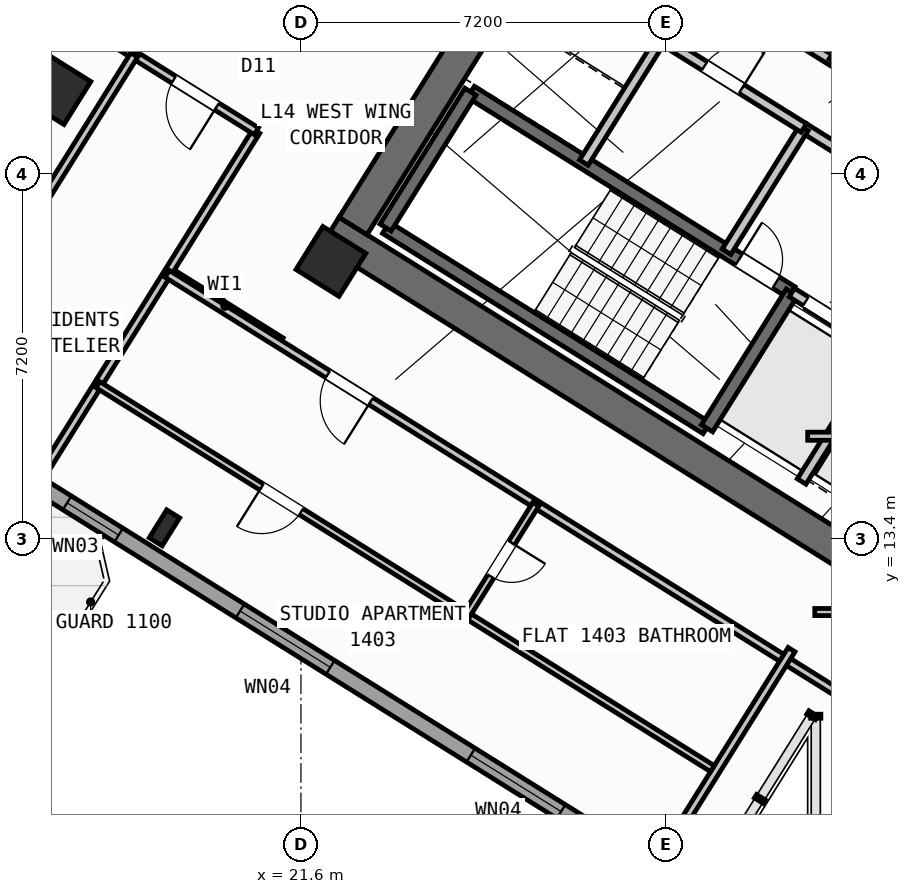
"""IFC4 building model, lengths in metres.
Left out: names, types, materials, properties, quantities, classifications, styles, units other than length and angle.
Written with IfcOpenShell. Run it as: python <this file> out.ifc"""

import sys

from ifc_helpers import new_model, si_unit, direction, frame, frame_2d, origin, origin_2d, place, context, subcontext, project, spatial, rectangle, hollow_rectangle, i_section, extrude, source, transform, mapped, element, fill, save


model = new_model("IFC4")
c1 = context("Model", 3, precision=1e-05, world=origin(), true_north=direction((0.0, 1.0)))
c2 = subcontext(c1, "Body", "Model", "MODEL_VIEW")
j1 = project(units=[si_unit("LENGTHUNIT", "METRE"), si_unit("PLANEANGLEUNIT", "RADIAN")], contexts=[c1])
p1 = place(None, origin())
s1 = spatial("IfcSite", under=j1, at=p1, CompositionType="ELEMENT")
p2 = place(p1, origin())
s2 = spatial("IfcBuilding", under=s1, at=p2, CompositionType="ELEMENT")
p3 = place(p2, frame((0.0, 0.0, 56.4)))
s3 = spatial("IfcBuildingStorey", under=s2, at=p3, CompositionType="ELEMENT", Elevation=56.4)
p4 = place(p3, frame((33.409, 12.45, 0.0), z_axis=(0.0, 0.0, 1.0), x_axis=(-0.848051132073, 0.529914405721, 0.0)))
e1 = element("IfcWall", 1, at=p4, inside=s3, PredefinedType="SHEAR", context=c2, shape_type="SweptSolid", body=[
    extrude(rectangle(XDim=13.24, YDim=0.65, at=frame_2d((6.62, 0.0))), origin(), (0.0, 0.0, 1.0), 3.35),
])
p5 = place(p3, frame((26.007, 24.976, 0.0), z_axis=(0.0, 0.0, 1.0), x_axis=(-0.529916319127, -0.848049936456, 0.0)))
e2 = element("IfcWall", 2, at=p5, inside=s3, PredefinedType="SHEAR", context=c2, shape_type="SweptSolid", body=[
    extrude(rectangle(XDim=6.375, YDim=0.65, at=frame_2d((3.188, 0.0))), origin(), (0.0, 0.0, 1.0), 3.35),
])
m1 = source(origin(), c2, "Body", "SweptSolid", [
    extrude(hollow_rectangle(XDim=1.0, YDim=1.0, WallThickness=0.04, at=origin_2d()), origin(), (0.0, 0.0, 1.0), 3.6),
])
p6 = place(p3, frame((22.191, 18.87, 0.0), z_axis=(0.0, 0.0, 1.0), x_axis=(-0.848048096156, 0.529919264233, 0.0)))
e3 = element("IfcColumn", 3, at=p6, inside=s3, PredefinedType="COLUMN", context=c2, shape_type="MappedRepresentation", body=[
    mapped(m1, transform((0.0, 0.0, 0.0), scale=1.0)),
])
m2 = source(origin(), c2, "Body", "SweptSolid", [
    extrude(i_section(OverallWidth=0.3, OverallDepth=0.65, WebThickness=0.016, FlangeThickness=0.031, at=origin_2d()), origin(), (0.0, 0.0, 1.0), 3.6),
])
p7 = place(p3, frame((18.906, 13.612, 0.0), z_axis=(0.0, 0.0, 1.0), x_axis=(-0.848048096156, 0.529919264233, 0.0)))
e4 = element("IfcColumn", 4, at=p7, inside=s3, PredefinedType="COLUMN", context=c2, shape_type="MappedRepresentation", body=[
    mapped(m2, transform((0.0, 0.0, 0.0), scale=1.0)),
])
p8 = place(p3, frame((16.764, 22.261, 0.0), z_axis=(0.0, 0.0, 1.0), x_axis=(-0.848048096156, 0.529919264233, 0.0)))
e5 = element("IfcColumn", 5, at=p8, inside=s3, PredefinedType="COLUMN", context=c2, shape_type="MappedRepresentation", body=[
    mapped(m1, transform((0.0, 0.0, 0.0), scale=1.0)),
])
p9 = place(p3, frame((29.268, 6.429, 0.0), z_axis=(0.0, 0.0, 1.0), x_axis=(-0.848049971435, 0.529916263149, 0.0)))
e6 = element("IfcWall", 6, at=p9, inside=s3, PredefinedType="STANDARD", context=c2, shape_type="SweptSolid", body=[
    extrude(rectangle(XDim=31.588, YDim=0.32, at=frame_2d((15.794, 0.0))), origin(), (0.0, 0.0, 1.0), 3.35),
])
p10 = place(p9, frame((16.235, 0.0, 0.0)))
e7 = element("IfcOpeningElement", 7, at=p10, cuts=e6, PredefinedType="OPENING", context=c2, shape_type="SweptSolid", body=[
    extrude(rectangle(XDim=1.2, YDim=2.15, at=frame_2d((0.6, 1.075))), frame((0.0, 0.17, 0.0), z_axis=(0.0, -1.0, 0.0), x_axis=(1.0, 0.0, 0.0)), (0.0, 0.0, 1.0), 0.34),
])
p11 = place(p9, frame((2.989, 0.0, 0.8)))
e8 = element("IfcOpeningElement", 8, at=p11, cuts=e6, PredefinedType="OPENING", context=c2, shape_type="SweptSolid", body=[
    extrude(rectangle(XDim=2.1, YDim=1.55, at=frame_2d((1.05, 0.775))), frame((0.0, 0.17, 0.0), z_axis=(0.0, -1.0, 0.0), x_axis=(1.0, 0.0, 0.0)), (0.0, 0.0, 1.0), 0.34),
])
p12 = place(p9, frame((8.359, 0.0, 0.8)))
e9 = element("IfcOpeningElement", 9, at=p12, cuts=e6, PredefinedType="OPENING", context=c2, shape_type="SweptSolid", body=[
    extrude(rectangle(XDim=2.1, YDim=1.55, at=frame_2d((1.05, 0.775))), frame((0.0, 0.17, 0.0), z_axis=(0.0, -1.0, 0.0), x_axis=(1.0, 0.0, 0.0)), (0.0, 0.0, 1.0), 0.34),
])
p13 = place(p9, frame((13.284, 0.0, 0.95)))
e10 = element("IfcOpeningElement", 10, at=p13, cuts=e6, PredefinedType="OPENING", context=c2, shape_type="SweptSolid", body=[
    extrude(rectangle(XDim=1.2, YDim=1.4, at=frame_2d((0.6, 0.7))), frame((0.0, 0.17, 0.0), z_axis=(0.0, -1.0, 0.0), x_axis=(1.0, 0.0, 0.0)), (0.0, 0.0, 1.0), 0.34),
])
p14 = place(p9, frame((22.374, 0.0, 0.95)))
e11 = element("IfcOpeningElement", 11, at=p14, cuts=e6, PredefinedType="OPENING", context=c2, shape_type="SweptSolid", body=[
    extrude(rectangle(XDim=1.2, YDim=1.4, at=frame_2d((0.6, 0.7))), frame((0.0, 0.17, 0.0), z_axis=(0.0, -1.0, 0.0), x_axis=(1.0, 0.0, 0.0)), (0.0, 0.0, 1.0), 0.34),
])
p15 = place(p9, frame((26.351, 0.0, 1.0)))
e12 = element("IfcOpeningElement", 12, at=p15, cuts=e6, PredefinedType="OPENING", context=c2, shape_type="SweptSolid", body=[
    extrude(rectangle(XDim=0.9, YDim=1.25, at=frame_2d((0.45, 0.625))), frame((0.0, 0.17, 0.0), z_axis=(0.0, -1.0, 0.0), x_axis=(1.0, 0.0, 0.0)), (0.0, 0.0, 1.0), 0.34),
])
p16 = place(p9, frame((29.052, 0.0, 0.85)))
e13 = element("IfcOpeningElement", 13, at=p16, cuts=e6, PredefinedType="OPENING", context=c2, shape_type="SweptSolid", body=[
    extrude(rectangle(XDim=1.8, YDim=1.5, at=frame_2d((0.9, 0.75))), frame((0.0, 0.17, 0.0), z_axis=(0.0, -1.0, 0.0), x_axis=(1.0, 0.0, 0.0)), (0.0, 0.0, 1.0), 0.34),
])
p17 = place(p3, frame((29.605, 15.581, 0.0), z_axis=(0.0, 0.0, 1.0), x_axis=(-0.848036911448, 0.529937163087, 0.0)))
e14 = element("IfcWall", 14, at=p17, inside=s3, PredefinedType="SHEAR", context=c2, shape_type="SweptSolid", body=[
    extrude(rectangle(XDim=7.46, YDim=0.26, at=frame_2d((3.73, 0.0))), origin(), (0.0, 0.0, 1.0), 3.35),
])
p18 = place(p3, frame((31.28, 18.261, 0.0), z_axis=(0.0, 0.0, 1.0), x_axis=(-0.848051618787, 0.529913626805, 0.0)))
e15 = element("IfcWall", 15, at=p18, inside=s3, PredefinedType="SHEAR", context=c2, shape_type="SweptSolid", body=[
    extrude(rectangle(XDim=7.46, YDim=0.26, at=frame_2d((3.73, 0.0))), origin(), (0.0, 0.0, 1.0), 3.35),
])
p19 = place(p18, frame((0.36, 0.0, 0.0)))
e16 = element("IfcOpeningElement", 16, at=p19, cuts=e15, PredefinedType="OPENING", context=c2, shape_type="SweptSolid", body=[
    extrude(rectangle(XDim=0.86, YDim=2.05, at=frame_2d((0.43, 1.025))), frame((0.0, 0.14, 0.0), z_axis=(0.0, -1.0, 0.0), x_axis=(1.0, 0.0, 0.0)), (0.0, 0.0, 1.0), 0.28),
])
p20 = place(p3, frame((31.288, 18.256, 0.0), z_axis=(0.0, 0.0, 1.0), x_axis=(-0.529943379326, -0.848033026897, 0.0)))
e17 = element("IfcWall", 17, at=p20, inside=s3, PredefinedType="SHEAR", context=c2, shape_type="SweptSolid", body=[
    extrude(rectangle(XDim=3.16, YDim=0.26, at=frame_2d((1.58, 0.0))), origin(), (0.0, 0.0, 1.0), 3.35),
])
p21 = place(p3, frame((24.945, 22.22, 0.0), z_axis=(0.0, 0.0, 1.0), x_axis=(-0.529908658664, -0.84805472316, 0.0)))
e18 = element("IfcWall", 18, at=p21, inside=s3, PredefinedType="SHEAR", context=c2, shape_type="SweptSolid", body=[
    extrude(rectangle(XDim=3.16, YDim=0.26, at=frame_2d((1.58, 0.0))), origin(), (0.0, 0.0, 1.0), 3.35),
])
p22 = place(p3, frame((38.046, 21.108, 0.0), z_axis=(0.0, 0.0, 1.0), x_axis=(-0.848054434086, 0.529909121291, 0.0)))
e19 = element("IfcWall", 19, at=p22, inside=s3, PredefinedType="SHEAR", context=c2, shape_type="SweptSolid", body=[
    extrude(rectangle(XDim=7.33, YDim=0.26, at=frame_2d((3.665, 0.0))), origin(), (0.0, 0.0, 1.0), 3.35),
])
p23 = place(p22, frame((0.22, 0.0, 0.0)))
e20 = element("IfcOpeningElement", 20, at=p23, cuts=e19, PredefinedType="OPENING", context=c2, shape_type="SweptSolid", body=[
    extrude(rectangle(XDim=1.1, YDim=2.1, at=frame_2d((0.55, 1.05))), frame((0.0, 0.14, 0.0), z_axis=(0.0, -1.0, 0.0), x_axis=(1.0, 0.0, 0.0)), (0.0, 0.0, 1.0), 0.28),
])
p24 = place(p3, frame((34.848, 16.031, 0.0), z_axis=(0.0, 0.0, 1.0), x_axis=(-0.848044042236, 0.529925751807, 0.0)))
e21 = element("IfcWall", 21, at=p24, inside=s3, PredefinedType="STANDARD", context=c2, shape_type="SweptSolid", body=[
    extrude(rectangle(XDim=4.198, YDim=0.2, at=frame_2d((2.099, 0.0))), origin(), (0.0, 0.0, 1.0), 3.34),
])
p25 = place(p24, frame((0.348, 0.0, 0.0)))
e22 = element("IfcOpeningElement", 22, at=p25, cuts=e21, PredefinedType="OPENING", context=c2, shape_type="SweptSolid", body=[
    extrude(rectangle(XDim=1.3, YDim=2.2, at=frame_2d((0.65, 1.1))), frame((0.0, 0.11, 0.0), z_axis=(0.0, -1.0, 0.0), x_axis=(1.0, 0.0, 0.0)), (0.0, 0.0, 1.0), 0.22),
])
p26 = place(p24, frame((2.423, 0.0, 0.0)))
e23 = element("IfcOpeningElement", 23, at=p26, cuts=e21, PredefinedType="OPENING", context=c2, shape_type="SweptSolid", body=[
    extrude(rectangle(XDim=1.45, YDim=2.25, at=frame_2d((0.725, 1.125))), frame((0.0, 0.11, 0.0), z_axis=(0.0, -1.0, 0.0), x_axis=(1.0, 0.0, 0.0)), (0.0, 0.0, 1.0), 0.22),
])
p27 = place(p3, frame((36.374, 18.474, 0.0), z_axis=(0.0, 0.0, 1.0), x_axis=(-0.848051071577, 0.529914502535, 0.0)))
e24 = element("IfcWall", 24, at=p27, inside=s3, PredefinedType="STANDARD", context=c2, shape_type="SweptSolid", body=[
    extrude(rectangle(XDim=5.718, YDim=0.2, at=frame_2d((2.859, 0.0))), origin(), (0.0, 0.0, 1.0), 3.34),
])
p28 = place(p27, frame((2.498, 0.0, 0.0)))
e25 = element("IfcOpeningElement", 25, at=p28, cuts=e24, PredefinedType="OPENING", context=c2, shape_type="SweptSolid", body=[
    extrude(rectangle(XDim=1.15, YDim=2.1, at=frame_2d((0.575, 1.05))), frame((0.0, 0.11, 0.0), z_axis=(0.0, -1.0, 0.0), x_axis=(1.0, 0.0, 0.0)), (0.0, 0.0, 1.0), 0.22),
])
p29 = place(p3, frame((32.108, 22.814, 0.0), z_axis=(0.0, 0.0, 1.0), x_axis=(-0.848042229521, 0.529928652696, 0.0)))
e26 = element("IfcWall", 26, at=p29, inside=s3, PredefinedType="STANDARD", context=c2, shape_type="SweptSolid", body=[
    extrude(rectangle(XDim=5.62, YDim=0.2, at=frame_2d((2.81, 0.0))), origin(), (0.0, 0.0, 1.0), 3.34),
])
p30 = place(p3, frame((32.982, 24.213, 0.0), z_axis=(0.0, 0.0, 1.0), x_axis=(-0.529839334948, -0.84809803628, 0.0)))
e27 = element("IfcWall", 27, at=p30, inside=s3, PredefinedType="STANDARD", context=c2, shape_type="SweptSolid", body=[
    extrude(rectangle(XDim=1.65, YDim=0.2, at=frame_2d((0.825, 0.0))), origin(), (0.0, 0.0, 1.0), 3.34),
])
p31 = place(p3, frame((33.029, 17.003, 0.0), z_axis=(0.0, 0.0, 1.0), x_axis=(-0.529916267533, -0.848049968695, 0.0)))
e28 = element("IfcWall", 28, at=p31, inside=s3, PredefinedType="STANDARD", context=c2, shape_type="SweptSolid", body=[
    extrude(rectangle(XDim=2.92, YDim=0.2, at=frame_2d((1.46, 0.0))), origin(), (0.0, 0.0, 1.0), 3.34),
])
for number, where, z_axis, x_axis in (
    (29, (31.525, 21.504, 0.0), (0.0, 0.0, 1.0), (-0.53, -0.848, 0.0)),
    (30, (28.71, 23.263, 0.0), (0.0, 0.0, 1.0), (-0.53, -0.848, 0.0)),
):
    element("IfcWall", number, at=place(p3, frame(where, z_axis=z_axis, x_axis=x_axis)), inside=s3, PredefinedType="STANDARD", context=c2, shape_type="SweptSolid", body=[
        extrude(rectangle(XDim=2.88, YDim=0.2, at=frame_2d((1.44, 0.0))), origin(), (0.0, 0.0, 1.0), 3.34),
    ])
p32 = place(p3, frame((31.525, 21.504, 0.0), z_axis=(0.0, 0.0, 1.0), x_axis=(-0.848044998614, 0.529924221305, 0.0)))
e31 = element("IfcWall", 31, at=p32, inside=s3, PredefinedType="STANDARD", context=c2, shape_type="SweptSolid", body=[
    extrude(rectangle(XDim=6.168, YDim=0.2, at=frame_2d((3.084, 0.0))), origin(), (0.0, 0.0, 1.0), 3.34),
])
p33 = place(p32, frame((4.4, 0.0, 0.0)))
e32 = element("IfcOpeningElement", 32, at=p33, cuts=e31, PredefinedType="OPENING", context=c2, shape_type="SweptSolid", body=[
    extrude(rectangle(XDim=0.86, YDim=2.05, at=frame_2d((0.43, 1.025))), frame((0.0, 0.11, 0.0), z_axis=(0.0, -1.0, 0.0), x_axis=(1.0, 0.0, 0.0)), (0.0, 0.0, 1.0), 0.22),
])
p34 = place(p32, frame((1.45, 0.0, 0.0)))
e33 = element("IfcOpeningElement", 33, at=p34, cuts=e31, PredefinedType="OPENING", context=c2, shape_type="SweptSolid", body=[
    extrude(rectangle(XDim=0.86, YDim=2.05, at=frame_2d((0.43, 1.025))), frame((0.0, 0.11, 0.0), z_axis=(0.0, -1.0, 0.0), x_axis=(1.0, 0.0, 0.0)), (0.0, 0.0, 1.0), 0.22),
])
p35 = place(p3, frame((21.206, 17.292, 0.0), z_axis=(0.0, 0.0, 1.0), x_axis=(-0.848050851465, 0.529914854792, 0.0)))
e34 = element("IfcWall", 34, at=p35, inside=s3, PredefinedType="PARTITIONING", context=c2, shape_type="SweptSolid", body=[
    extrude(rectangle(XDim=2.61, YDim=0.16, at=frame_2d((1.305, 0.0))), origin(), (0.0, 0.0, 1.0), 3.34),
])
p36 = place(p3, frame((20.719, 21.44, 0.0), z_axis=(0.0, 0.0, 1.0), x_axis=(-0.529906246318, -0.848056230514, 0.0)))
e35 = element("IfcWall", 35, at=p36, inside=s3, PredefinedType="PARTITIONING", context=c2, shape_type="SweptSolid", body=[
    extrude(rectangle(XDim=8.05, YDim=0.16, at=frame_2d((4.025, 0.0))), origin(), (0.0, 0.0, 1.0), 3.34),
])
p37 = place(p3, frame((20.719, 21.44, 0.0), z_axis=(0.0, 0.0, 1.0), x_axis=(-0.848048310262, 0.529918921593, 0.0)))
e36 = element("IfcWall", 36, at=p37, inside=s3, PredefinedType="PARTITIONING", context=c2, shape_type="SweptSolid", body=[
    extrude(rectangle(XDim=16.73, YDim=0.16, at=frame_2d((8.365, 0.0))), origin(), (0.0, 0.0, 1.0), 3.34),
])
p38 = place(p37, frame((0.92, 0.0, 0.0)))
e37 = element("IfcOpeningElement", 37, at=p38, cuts=e36, PredefinedType="OPENING", context=c2, shape_type="SweptSolid", body=[
    extrude(rectangle(XDim=1.0, YDim=2.1, at=frame_2d((0.5, 1.05))), frame((0.0, 0.09, 0.0), z_axis=(0.0, -1.0, 0.0), x_axis=(1.0, 0.0, 0.0)), (0.0, 0.0, 1.0), 0.18),
])
p39 = place(p37, frame((4.408, 0.0, 0.0)))
e38 = element("IfcOpeningElement", 38, at=p39, cuts=e36, PredefinedType="OPENING", context=c2, shape_type="SweptSolid", body=[
    extrude(rectangle(XDim=1.0, YDim=2.1, at=frame_2d((0.5, 1.05))), frame((0.0, 0.09, 0.0), z_axis=(0.0, -1.0, 0.0), x_axis=(1.0, 0.0, 0.0)), (0.0, 0.0, 1.0), 0.18),
])
p40 = place(p37, frame((7.271, 0.0, 0.0)))
e39 = element("IfcOpeningElement", 39, at=p40, cuts=e36, PredefinedType="OPENING", context=c2, shape_type="SweptSolid", body=[
    extrude(rectangle(XDim=1.0, YDim=2.1, at=frame_2d((0.5, 1.05))), frame((0.0, 0.09, 0.0), z_axis=(0.0, -1.0, 0.0), x_axis=(1.0, 0.0, 0.0)), (0.0, 0.0, 1.0), 0.18),
])
p41 = place(p37, frame((10.78, 0.0, 0.0)))
e40 = element("IfcOpeningElement", 40, at=p41, cuts=e36, PredefinedType="OPENING", context=c2, shape_type="SweptSolid", body=[
    extrude(rectangle(XDim=1.0, YDim=2.1, at=frame_2d((0.5, 1.05))), frame((0.0, 0.09, 0.0), z_axis=(0.0, -1.0, 0.0), x_axis=(1.0, 0.0, 0.0)), (0.0, 0.0, 1.0), 0.18),
])
p42 = place(p37, frame((14.372, 0.0, 0.0)))
e41 = element("IfcOpeningElement", 41, at=p42, cuts=e36, PredefinedType="OPENING", context=c2, shape_type="SweptSolid", body=[
    extrude(rectangle(XDim=1.0, YDim=2.1, at=frame_2d((0.5, 1.05))), frame((0.0, 0.09, 0.0), z_axis=(0.0, -1.0, 0.0), x_axis=(1.0, 0.0, 0.0)), (0.0, 0.0, 1.0), 0.18),
])
p43 = place(p3, frame((18.31, 22.946, 0.0), z_axis=(0.0, 0.0, 1.0), x_axis=(-0.529914428959, -0.848051117552, 0.0)))
e42 = element("IfcWall", 42, at=p43, inside=s3, PredefinedType="PARTITIONING", context=c2, shape_type="SweptSolid", body=[
    extrude(rectangle(XDim=8.05, YDim=0.16, at=frame_2d((4.025, 0.0))), origin(), (0.0, 0.0, 1.0), 3.34),
])
p44 = place(p3, frame((32.164, 10.374, 0.0), z_axis=(0.0, 0.0, 1.0), x_axis=(-0.848044107957, 0.529925646633, 0.0)))
e43 = element("IfcWall", 43, at=p44, inside=s3, PredefinedType="PARTITIONING", context=c2, shape_type="SweptSolid", body=[
    extrude(rectangle(XDim=15.57, YDim=0.16, at=frame_2d((7.785, 0.0))), origin(), (0.0, 0.0, 1.0), 3.34),
])
p45 = place(p44, frame((10.83, 0.0, 0.0)))
e44 = element("IfcOpeningElement", 44, at=p45, cuts=e43, PredefinedType="OPENING", context=c2, shape_type="SweptSolid", body=[
    extrude(rectangle(XDim=1.0, YDim=2.1, at=frame_2d((0.5, 1.05))), frame((0.0, 0.09, 0.0), z_axis=(0.0, -1.0, 0.0), x_axis=(1.0, 0.0, 0.0)), (0.0, 0.0, 1.0), 0.18),
])
p46 = place(p3, frame((31.282, 11.208, 0.0), z_axis=(0.0, 0.0, 1.0), x_axis=(-0.529938869374, -0.84803584519, 0.0)))
e45 = element("IfcWall", 45, at=p46, inside=s3, PredefinedType="PARTITIONING", context=c2, shape_type="SweptSolid", body=[
    extrude(rectangle(XDim=5.48, YDim=0.16, at=frame_2d((2.74, 0.0))), origin(), (0.0, 0.0, 1.0), 3.34),
])
p47 = place(p3, frame((29.72, 8.859, 0.0), z_axis=(0.0, 0.0, 1.0), x_axis=(-0.848049134363, 0.529917602752, 0.0)))
e46 = element("IfcWall", 46, at=p47, inside=s3, PredefinedType="PLUMBINGWALL", context=c2, shape_type="SweptSolid", body=[
    extrude(rectangle(XDim=14.3, YDim=0.14, at=frame_2d((7.15, 0.0))), origin(), (0.0, 0.0, 1.0), 3.34),
])
p48 = place(p47, frame((9.57, 0.0, 0.0)))
e47 = element("IfcOpeningElement", 47, at=p48, cuts=e46, PredefinedType="OPENING", context=c2, shape_type="SweptSolid", body=[
    extrude(rectangle(XDim=0.92, YDim=2.08, at=frame_2d((0.46, 1.04))), frame((0.0, 0.08, 0.0), z_axis=(0.0, -1.0, 0.0), x_axis=(1.0, 0.0, 0.0)), (0.0, 0.0, 1.0), 0.16),
])
p49 = place(p3, frame((26.237, 14.078, 0.0), z_axis=(0.0, 0.0, 1.0), x_axis=(-0.52995640672, -0.848024885824, 0.0)))
e48 = element("IfcWall", 48, at=p49, inside=s3, PredefinedType="PLUMBINGWALL", context=c2, shape_type="SweptSolid", body=[
    extrude(rectangle(XDim=2.58, YDim=0.14, at=frame_2d((1.29, 0.0))), origin(), (0.0, 0.0, 1.0), 3.34),
])
p50 = place(p49, frame((0.9, 0.0, 0.0)))
e49 = element("IfcOpeningElement", 49, at=p50, cuts=e48, PredefinedType="OPENING", context=c2, shape_type="SweptSolid", body=[
    extrude(rectangle(XDim=0.78, YDim=2.05, at=frame_2d((0.39, 1.025))), frame((0.0, 0.08, 0.0), z_axis=(0.0, -1.0, 0.0), x_axis=(1.0, 0.0, 0.0)), (0.0, 0.0, 1.0), 0.16),
])
p51 = place(p3, frame((31.6, 15.42, 0.0), z_axis=(0.0, 0.0, 1.0), x_axis=(1.0, 0.0, 0.0)))
e50 = element("IfcWall", 50, at=p51, inside=s3, PredefinedType="PARTITIONING", context=c2, shape_type="SweptSolid", body=[
    extrude(rectangle(XDim=2.866, YDim=0.16, at=frame_2d((1.433, 0.0))), origin(), (0.0, 0.0, 1.0), 3.34),
])
p52 = place(p3, frame((31.74, 11.95, 0.0), z_axis=(0.0, 0.0, 1.0), x_axis=(1.0, 0.0, 0.0)))
e51 = element("IfcWall", 51, at=p52, inside=s3, PredefinedType="PLUMBINGWALL", context=c2, shape_type="SweptSolid", body=[
    extrude(rectangle(XDim=0.617, YDim=0.14, at=frame_2d((0.309, 0.0))), origin(), (0.0, 0.0, 1.0), 3.34),
])
m3 = source(origin(), c2, "Body", "SweptSolid", [
    extrude(rectangle(XDim=2.1, YDim=1.55, at=frame_2d((1.05, 0.775))), frame((0.0, 0.03, 0.0), z_axis=(0.0, -1.0, 0.0), x_axis=(1.0, 0.0, 0.0)), (0.0, 0.0, 1.0), 0.06),
])
p53 = place(p11, origin())
e52 = element("IfcWindow", 52, at=p53, inside=s3, PartitioningType="SINGLE_PANEL", PredefinedType="WINDOW", context=c2, shape_type="MappedRepresentation", body=[
    mapped(m3, transform((0.0, 0.0, 0.0), scale=1.0)),
])
fill(e8, e52)
p54 = place(p12, origin())
e53 = element("IfcWindow", 53, at=p54, inside=s3, PartitioningType="SINGLE_PANEL", PredefinedType="WINDOW", context=c2, shape_type="MappedRepresentation", body=[
    mapped(m3, transform((0.0, 0.0, 0.0), scale=1.0)),
])
fill(e9, e53)
m4 = source(origin(), c2, "Body", "SweptSolid", [
    extrude(rectangle(XDim=1.2, YDim=1.4, at=frame_2d((0.6, 0.7))), frame((0.0, 0.03, 0.0), z_axis=(0.0, -1.0, 0.0), x_axis=(1.0, 0.0, 0.0)), (0.0, 0.0, 1.0), 0.06),
])
p55 = place(p13, origin())
e54 = element("IfcWindow", 54, at=p55, inside=s3, PartitioningType="SINGLE_PANEL", PredefinedType="WINDOW", context=c2, shape_type="MappedRepresentation", body=[
    mapped(m4, transform((0.0, 0.0, 0.0), scale=1.0)),
])
fill(e10, e54)
m5 = source(origin(), c2, "Body", "SweptSolid", [
    extrude(rectangle(XDim=0.86, YDim=2.05, at=frame_2d((0.43, 1.025))), frame((0.0, 0.025, 0.0), z_axis=(0.0, -1.0, 0.0), x_axis=(1.0, 0.0, 0.0)), (0.0, 0.0, 1.0), 0.05),
])
p56 = place(p19, frame((0.86, 0.0, 0.0), z_axis=(0.0, 0.0, 1.0), x_axis=(-1.0, 0.0, 0.0)))
e55 = element("IfcDoor", 55, at=p56, inside=s3, OperationType="SINGLE_SWING_LEFT", PredefinedType="DOOR", context=c2, shape_type="MappedRepresentation", body=[
    mapped(m5, transform((0.0, 0.0, 0.0), scale=1.0)),
])
fill(e16, e55)
m6 = source(origin(), c2, "Body", "SweptSolid", [
    extrude(rectangle(XDim=1.45, YDim=2.25, at=frame_2d((0.725, 1.125))), frame((0.0, 0.025, 0.0), z_axis=(0.0, -1.0, 0.0), x_axis=(1.0, 0.0, 0.0)), (0.0, 0.0, 1.0), 0.05),
])
p57 = place(p26, origin())
e56 = element("IfcDoor", 56, at=p57, inside=s3, OperationType="DOUBLE_DOOR_SLIDING", PredefinedType="DOOR", context=c2, shape_type="MappedRepresentation", body=[
    mapped(m6, transform((0.0, 0.0, 0.0), scale=1.0)),
])
fill(e23, e56)
p58 = place(p34, frame((0.86, 0.0, 0.0), z_axis=(0.0, 0.0, 1.0), x_axis=(-1.0, 0.0, 0.0)))
e57 = element("IfcDoor", 57, at=p58, inside=s3, OperationType="SINGLE_SWING_RIGHT", PredefinedType="DOOR", context=c2, shape_type="MappedRepresentation", body=[
    mapped(m5, transform((0.0, 0.0, 0.0), scale=1.0)),
])
fill(e33, e57)
m7 = source(origin(), c2, "Body", "SweptSolid", [
    extrude(rectangle(XDim=1.0, YDim=2.1, at=frame_2d((0.5, 1.05))), frame((0.0, 0.025, 0.0), z_axis=(0.0, -1.0, 0.0), x_axis=(1.0, 0.0, 0.0)), (0.0, 0.0, 1.0), 0.05),
])
p59 = place(p38, origin())
e58 = element("IfcDoor", 58, at=p59, inside=s3, OperationType="SINGLE_SWING_LEFT", PredefinedType="DOOR", context=c2, shape_type="MappedRepresentation", body=[
    mapped(m7, transform((0.0, 0.0, 0.0), scale=1.0)),
])
fill(e37, e58)
p60 = place(p45, origin())
e59 = element("IfcDoor", 59, at=p60, inside=s3, OperationType="SINGLE_SWING_LEFT", PredefinedType="DOOR", context=c2, shape_type="MappedRepresentation", body=[
    mapped(m7, transform((0.0, 0.0, 0.0), scale=1.0)),
])
fill(e44, e59)
m8 = source(origin(), c2, "Body", "SweptSolid", [
    extrude(rectangle(XDim=0.92, YDim=2.08, at=frame_2d((0.46, 1.04))), frame((0.0, 0.025, 0.0), z_axis=(0.0, -1.0, 0.0), x_axis=(1.0, 0.0, 0.0)), (0.0, 0.0, 1.0), 0.05),
])
p61 = place(p48, origin())
e60 = element("IfcDoor", 60, at=p61, inside=s3, OperationType="SINGLE_SWING_RIGHT", PredefinedType="DOOR", context=c2, shape_type="MappedRepresentation", body=[
    mapped(m8, transform((0.0, 0.0, 0.0), scale=1.0)),
])
fill(e47, e60)
m9 = source(origin(), c2, "Body", "SweptSolid", [
    extrude(rectangle(XDim=0.78, YDim=2.05, at=frame_2d((0.39, 1.025))), frame((0.0, 0.025, 0.0), z_axis=(0.0, -1.0, 0.0), x_axis=(1.0, 0.0, 0.0)), (0.0, 0.0, 1.0), 0.05),
])
p62 = place(p50, origin())
e61 = element("IfcDoor", 61, at=p62, inside=s3, OperationType="SINGLE_SWING_LEFT", PredefinedType="DOOR", context=c2, shape_type="MappedRepresentation", body=[
    mapped(m9, transform((0.0, 0.0, 0.0), scale=1.0)),
])
fill(e49, e61)
save(model, sys.argv[1])
